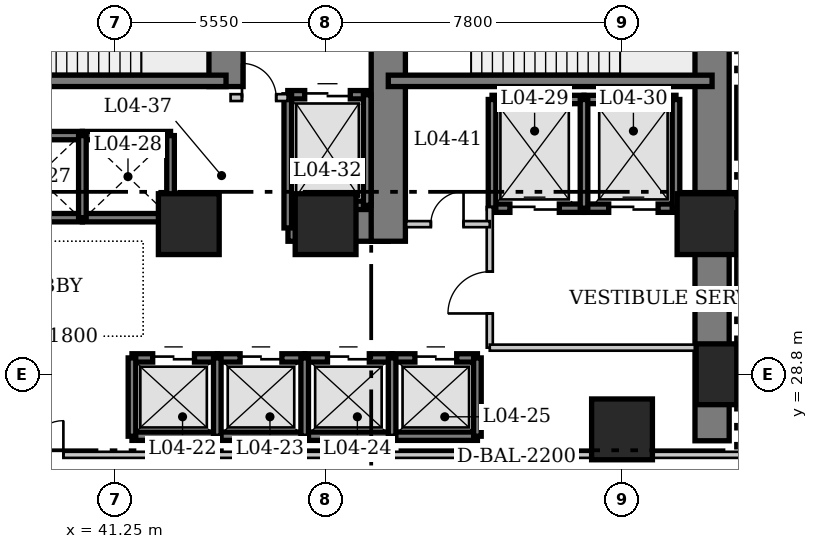
"""IFC4 building model, lengths in metres.
Left out: names, types, materials, properties, quantities, classifications, styles, units other than length and angle.
Written with IfcOpenShell. Run it as: python <this file> out.ifc"""

import sys

from ifc_helpers import new_model, si_unit, direction, frame, frame_2d, origin, origin_2d, place, context, subcontext, project, spatial, rectangle, extrude, element, fill, save


model = new_model("IFC4")
c1 = context("Model", 3, precision=1e-05, world=origin(), true_north=direction((0.0, 1.0)))
c2 = subcontext(c1, "Body", "Model", "MODEL_VIEW")
j1 = project(units=[si_unit("LENGTHUNIT", "METRE"), si_unit("PLANEANGLEUNIT", "RADIAN")], contexts=[c1])
p1 = place(None, origin())
s1 = spatial("IfcSite", under=j1, at=p1, CompositionType="ELEMENT")
p2 = place(p1, origin())
s2 = spatial("IfcBuilding", under=s1, at=p2, CompositionType="ELEMENT")
p3 = place(p2, frame((0.0, 0.0, 20.8)))
s3 = spatial("IfcBuildingStorey", under=s2, at=p3, CompositionType="ELEMENT", Elevation=20.8)
p4 = place(p3, frame((56.97, 27.05, 0.0), z_axis=(0.0, 0.0, 1.0), x_axis=(0.0, 1.0, 0.0)))
e1 = element("IfcWall", 1, at=p4, inside=s3, PredefinedType="SHEAR", context=c2, shape_type="SweptSolid", body=[
    extrude(rectangle(XDim=13.72, YDim=0.9, at=frame_2d((6.86, 0.0))), origin(), (0.0, 0.0, 1.0), 5.2),
])
p5 = place(p3, frame((45.81, 32.75, 0.0), z_axis=(0.0, 0.0, 1.0), x_axis=(1.0, 0.0, 0.0)))
e2 = element("IfcWall", 2, at=p5, inside=s3, PredefinedType="SHEAR", context=c2, shape_type="SweptSolid", body=[
    extrude(rectangle(XDim=2.64, YDim=0.9, at=frame_2d((1.32, 0.0))), origin(), (0.0, 0.0, 1.0), 5.2),
])
p6 = place(p3, frame((44.18, 36.37, 0.0), z_axis=(0.0, 0.0, 1.0), x_axis=(0.0, 1.0, 0.0)))
e3 = element("IfcWall", 3, at=p6, inside=s3, PredefinedType="SHEAR", context=c2, shape_type="SweptSolid", body=[
    extrude(rectangle(XDim=3.95, YDim=0.9, at=frame_2d((1.975, 0.0))), origin(), (0.0, 0.0, 1.0), 5.2),
])
p7 = place(p3, frame((48.45, 32.3, 0.0), z_axis=(0.0, 0.0, 1.0), x_axis=(0.0, 1.0, 0.0)))
e4 = element("IfcWall", 4, at=p7, inside=s3, PredefinedType="SHEAR", context=c2, shape_type="SweptSolid", body=[
    extrude(rectangle(XDim=8.02, YDim=0.9, at=frame_2d((4.01, 0.0))), origin(), (0.0, 0.0, 1.0), 5.2),
])
p8 = place(p7, frame((5.9, 0.0, 0.0)))
e5 = element("IfcOpeningElement", 5, at=p8, cuts=e4, PredefinedType="OPENING", context=c2, shape_type="SweptSolid", body=[
    extrude(rectangle(XDim=1.1, YDim=2.15, at=frame_2d((0.55, 1.075))), frame((0.0, 0.46, 0.0), z_axis=(0.0, -1.0, 0.0), x_axis=(1.0, 0.0, 0.0)), (0.0, 0.0, 1.0), 0.92),
])
p9 = place(p3, frame((35.85, 36.52, 0.0), z_axis=(0.0, 0.0, 1.0), x_axis=(1.0, 0.0, 0.0)))
e6 = element("IfcWall", 6, at=p9, inside=s3, PredefinedType="SHEAR", context=c2, shape_type="SweptSolid", body=[
    extrude(rectangle(XDim=8.33, YDim=0.3, at=frame_2d((4.165, 0.0))), origin(), (0.0, 0.0, 1.0), 5.2),
])
p10 = place(p3, frame((48.45, 36.52, 0.0), z_axis=(0.0, 0.0, 1.0), x_axis=(1.0, 0.0, 0.0)))
e7 = element("IfcWall", 7, at=p10, inside=s3, PredefinedType="SHEAR", context=c2, shape_type="SweptSolid", body=[
    extrude(rectangle(XDim=8.52, YDim=0.3, at=frame_2d((4.26, 0.0))), origin(), (0.0, 0.0, 1.0), 5.2),
])
for number, where, z_axis, x_axis in (
    (8, (57.35, 28.8, 0.0), (0.0, 0.0, 1.0), (1.0, 0.0, 0.0)),
    (9, (43.2, 32.75, 0.0), (0.0, 0.0, 1.0), (1.0, 0.0, 0.0)),
    (10, (46.8, 32.75, 0.0), (0.0, 0.0, 1.0), (1.0, 0.0, 0.0)),
    (11, (54.6, 27.35, 0.0), (0.0, 0.0, 1.0), (1.0, 0.0, 0.0)),
    (12, (56.85, 32.75, 0.0), (0.0, 0.0, 1.0), (1.0, 0.0, 0.0)),
):
    element("IfcColumn", number, at=place(p3, frame(where, z_axis=z_axis, x_axis=x_axis)), inside=s3, PredefinedType="COLUMN", context=c2, shape_type="SweptSolid", body=[
        extrude(rectangle(XDim=1.6, YDim=1.6, at=origin_2d()), origin(), (0.0, 0.0, 1.0), 5.2),
    ])
p11 = place(p3, frame((41.705, 29.23, 0.0), z_axis=(0.0, 0.0, 1.0), x_axis=(1.0, 0.0, 0.0)))
e13 = element("IfcWall", 13, at=p11, inside=s3, PredefinedType="SHEAR", context=c2, shape_type="SweptSolid", body=[
    extrude(rectangle(XDim=2.245, YDim=0.22, at=frame_2d((1.123, 0.0))), origin(), (0.0, 0.0, 1.0), 5.2),
])
p12 = place(p11, frame((0.545, 0.0, 0.0)))
e14 = element("IfcOpeningElement", 14, at=p12, cuts=e13, PredefinedType="OPENING", context=c2, shape_type="SweptSolid", body=[
    extrude(rectangle(XDim=1.1, YDim=2.15, at=frame_2d((0.55, 1.075))), frame((0.0, 0.12, 0.0), z_axis=(0.0, -1.0, 0.0), x_axis=(1.0, 0.0, 0.0)), (0.0, 0.0, 1.0), 0.24),
])
p13 = place(p3, frame((41.705, 27.17, 0.0), z_axis=(0.0, 0.0, 1.0), x_axis=(1.0, 0.0, 0.0)))
e15 = element("IfcWall", 15, at=p13, inside=s3, PredefinedType="SHEAR", context=c2, shape_type="SweptSolid", body=[
    extrude(rectangle(XDim=2.245, YDim=0.22, at=frame_2d((1.123, 0.0))), origin(), (0.0, 0.0, 1.0), 5.2),
])
p14 = place(p3, frame((41.705, 27.17, 0.0), z_axis=(0.0, 0.0, 1.0), x_axis=(0.0, 1.0, 0.0)))
e16 = element("IfcWall", 16, at=p14, inside=s3, PredefinedType="SHEAR", context=c2, shape_type="SweptSolid", body=[
    extrude(rectangle(XDim=2.06, YDim=0.2, at=frame_2d((1.03, 0.0))), origin(), (0.0, 0.0, 1.0), 5.2),
])
p15 = place(p3, frame((43.95, 29.23, 0.0), z_axis=(0.0, 0.0, 1.0), x_axis=(1.0, 0.0, 0.0)))
e17 = element("IfcWall", 17, at=p15, inside=s3, PredefinedType="SHEAR", context=c2, shape_type="SweptSolid", body=[
    extrude(rectangle(XDim=2.3, YDim=0.22, at=frame_2d((1.15, 0.0))), origin(), (0.0, 0.0, 1.0), 5.2),
])
p16 = place(p15, frame((0.6, 0.0, 0.0)))
e18 = element("IfcOpeningElement", 18, at=p16, cuts=e17, PredefinedType="OPENING", context=c2, shape_type="SweptSolid", body=[
    extrude(rectangle(XDim=1.1, YDim=2.15, at=frame_2d((0.55, 1.075))), frame((0.0, 0.12, 0.0), z_axis=(0.0, -1.0, 0.0), x_axis=(1.0, 0.0, 0.0)), (0.0, 0.0, 1.0), 0.24),
])
p17 = place(p3, frame((43.95, 27.17, 0.0), z_axis=(0.0, 0.0, 1.0), x_axis=(1.0, 0.0, 0.0)))
e19 = element("IfcWall", 19, at=p17, inside=s3, PredefinedType="SHEAR", context=c2, shape_type="SweptSolid", body=[
    extrude(rectangle(XDim=2.3, YDim=0.22, at=frame_2d((1.15, 0.0))), origin(), (0.0, 0.0, 1.0), 5.2),
])
p18 = place(p3, frame((43.95, 27.17, 0.0), z_axis=(0.0, 0.0, 1.0), x_axis=(0.0, 1.0, 0.0)))
e20 = element("IfcWall", 20, at=p18, inside=s3, PredefinedType="SHEAR", context=c2, shape_type="SweptSolid", body=[
    extrude(rectangle(XDim=2.06, YDim=0.2, at=frame_2d((1.03, 0.0))), origin(), (0.0, 0.0, 1.0), 5.2),
])
p19 = place(p3, frame((46.25, 29.23, 0.0), z_axis=(0.0, 0.0, 1.0), x_axis=(1.0, 0.0, 0.0)))
e21 = element("IfcWall", 21, at=p19, inside=s3, PredefinedType="SHEAR", context=c2, shape_type="SweptSolid", body=[
    extrude(rectangle(XDim=2.3, YDim=0.22, at=frame_2d((1.15, 0.0))), origin(), (0.0, 0.0, 1.0), 5.2),
])
p20 = place(p19, frame((0.6, 0.0, 0.0)))
e22 = element("IfcOpeningElement", 22, at=p20, cuts=e21, PredefinedType="OPENING", context=c2, shape_type="SweptSolid", body=[
    extrude(rectangle(XDim=1.1, YDim=2.15, at=frame_2d((0.55, 1.075))), frame((0.0, 0.12, 0.0), z_axis=(0.0, -1.0, 0.0), x_axis=(1.0, 0.0, 0.0)), (0.0, 0.0, 1.0), 0.24),
])
p21 = place(p3, frame((46.25, 27.17, 0.0), z_axis=(0.0, 0.0, 1.0), x_axis=(1.0, 0.0, 0.0)))
e23 = element("IfcWall", 23, at=p21, inside=s3, PredefinedType="SHEAR", context=c2, shape_type="SweptSolid", body=[
    extrude(rectangle(XDim=2.3, YDim=0.22, at=frame_2d((1.15, 0.0))), origin(), (0.0, 0.0, 1.0), 5.2),
])
p22 = place(p3, frame((46.25, 27.17, 0.0), z_axis=(0.0, 0.0, 1.0), x_axis=(0.0, 1.0, 0.0)))
e24 = element("IfcWall", 24, at=p22, inside=s3, PredefinedType="SHEAR", context=c2, shape_type="SweptSolid", body=[
    extrude(rectangle(XDim=2.06, YDim=0.2, at=frame_2d((1.03, 0.0))), origin(), (0.0, 0.0, 1.0), 5.2),
])
p23 = place(p3, frame((48.55, 29.23, 0.0), z_axis=(0.0, 0.0, 1.0), x_axis=(1.0, 0.0, 0.0)))
e25 = element("IfcWall", 25, at=p23, inside=s3, PredefinedType="SHEAR", context=c2, shape_type="SweptSolid", body=[
    extrude(rectangle(XDim=2.245, YDim=0.22, at=frame_2d((1.123, 0.0))), origin(), (0.0, 0.0, 1.0), 5.2),
])
p24 = place(p23, frame((0.6, 0.0, 0.0)))
e26 = element("IfcOpeningElement", 26, at=p24, cuts=e25, PredefinedType="OPENING", context=c2, shape_type="SweptSolid", body=[
    extrude(rectangle(XDim=1.1, YDim=2.15, at=frame_2d((0.55, 1.075))), frame((0.0, 0.12, 0.0), z_axis=(0.0, -1.0, 0.0), x_axis=(1.0, 0.0, 0.0)), (0.0, 0.0, 1.0), 0.24),
])
p25 = place(p3, frame((48.55, 27.17, 0.0), z_axis=(0.0, 0.0, 1.0), x_axis=(1.0, 0.0, 0.0)))
e27 = element("IfcWall", 27, at=p25, inside=s3, PredefinedType="SHEAR", context=c2, shape_type="SweptSolid", body=[
    extrude(rectangle(XDim=2.245, YDim=0.22, at=frame_2d((1.123, 0.0))), origin(), (0.0, 0.0, 1.0), 5.2),
])
for number, where, z_axis, x_axis in (
    (28, (48.55, 27.17, 0.0), (0.0, 0.0, 1.0), (0.0, 1.0, 0.0)),
    (29, (50.795, 27.17, 0.0), (0.0, 0.0, 1.0), (0.0, 1.0, 0.0)),
):
    element("IfcWall", number, at=place(p3, frame(where, z_axis=z_axis, x_axis=x_axis)), inside=s3, PredefinedType="SHEAR", context=c2, shape_type="SweptSolid", body=[
        extrude(rectangle(XDim=2.06, YDim=0.2, at=frame_2d((1.03, 0.0))), origin(), (0.0, 0.0, 1.0), 5.2),
    ])
for number, where, z_axis, x_axis in (
    (30, (38.0, 35.08, 0.0), (0.0, 0.0, 1.0), (1.0, 0.0, 0.0)),
    (31, (38.0, 32.92, 0.0), (0.0, 0.0, 1.0), (1.0, 0.0, 0.0)),
):
    element("IfcWall", number, at=place(p3, frame(where, z_axis=z_axis, x_axis=x_axis)), inside=s3, PredefinedType="SHEAR", context=c2, shape_type="SweptSolid", body=[
        extrude(rectangle(XDim=2.4, YDim=0.22, at=frame_2d((1.2, 0.0))), origin(), (0.0, 0.0, 1.0), 5.2),
    ])
for number, where, z_axis, x_axis in (
    (32, (40.4, 35.08, 0.0), (0.0, 0.0, 1.0), (1.0, 0.0, 0.0)),
    (33, (40.4, 32.92, 0.0), (0.0, 0.0, 1.0), (1.0, 0.0, 0.0)),
):
    element("IfcWall", number, at=place(p3, frame(where, z_axis=z_axis, x_axis=x_axis)), inside=s3, PredefinedType="SHEAR", context=c2, shape_type="SweptSolid", body=[
        extrude(rectangle(XDim=2.32, YDim=0.22, at=frame_2d((1.16, 0.0))), origin(), (0.0, 0.0, 1.0), 5.2),
    ])
for number, where, z_axis, x_axis in (
    (34, (40.4, 32.92, 0.0), (0.0, 0.0, 1.0), (0.0, 1.0, 0.0)),
    (35, (42.72, 32.92, 0.0), (0.0, 0.0, 1.0), (0.0, 1.0, 0.0)),
):
    element("IfcWall", number, at=place(p3, frame(where, z_axis=z_axis, x_axis=x_axis)), inside=s3, PredefinedType="SHEAR", context=c2, shape_type="SweptSolid", body=[
        extrude(rectangle(XDim=2.16, YDim=0.2, at=frame_2d((1.08, 0.0))), origin(), (0.0, 0.0, 1.0), 5.2),
    ])
p26 = place(p3, frame((51.18, 36.03, 0.0), z_axis=(0.0, 0.0, 1.0), x_axis=(1.0, 0.0, 0.0)))
e36 = element("IfcWall", 36, at=p26, inside=s3, PredefinedType="SHEAR", context=c2, shape_type="SweptSolid", body=[
    extrude(rectangle(XDim=2.42, YDim=0.22, at=frame_2d((1.21, 0.0))), origin(), (0.0, 0.0, 1.0), 5.2),
])
p27 = place(p3, frame((51.18, 33.17, 0.0), z_axis=(0.0, 0.0, 1.0), x_axis=(1.0, 0.0, 0.0)))
e37 = element("IfcWall", 37, at=p27, inside=s3, PredefinedType="SHEAR", context=c2, shape_type="SweptSolid", body=[
    extrude(rectangle(XDim=2.42, YDim=0.22, at=frame_2d((1.21, 0.0))), origin(), (0.0, 0.0, 1.0), 5.2),
])
p28 = place(p27, frame((0.47, 0.0, 0.0)))
e38 = element("IfcOpeningElement", 38, at=p28, cuts=e37, PredefinedType="OPENING", context=c2, shape_type="SweptSolid", body=[
    extrude(rectangle(XDim=1.3, YDim=2.15, at=frame_2d((0.65, 1.075))), frame((0.0, 0.12, 0.0), z_axis=(0.0, -1.0, 0.0), x_axis=(1.0, 0.0, 0.0)), (0.0, 0.0, 1.0), 0.24),
])
p29 = place(p3, frame((51.18, 33.17, 0.0), z_axis=(0.0, 0.0, 1.0), x_axis=(0.0, 1.0, 0.0)))
e39 = element("IfcWall", 39, at=p29, inside=s3, PredefinedType="SHEAR", context=c2, shape_type="SweptSolid", body=[
    extrude(rectangle(XDim=2.86, YDim=0.2, at=frame_2d((1.43, 0.0))), origin(), (0.0, 0.0, 1.0), 5.2),
])
p30 = place(p3, frame((53.6, 36.03, 0.0), z_axis=(0.0, 0.0, 1.0), x_axis=(1.0, 0.0, 0.0)))
e40 = element("IfcWall", 40, at=p30, inside=s3, PredefinedType="SHEAR", context=c2, shape_type="SweptSolid", body=[
    extrude(rectangle(XDim=2.42, YDim=0.22, at=frame_2d((1.21, 0.0))), origin(), (0.0, 0.0, 1.0), 5.2),
])
p31 = place(p3, frame((53.6, 33.17, 0.0), z_axis=(0.0, 0.0, 1.0), x_axis=(1.0, 0.0, 0.0)))
e41 = element("IfcWall", 41, at=p31, inside=s3, PredefinedType="SHEAR", context=c2, shape_type="SweptSolid", body=[
    extrude(rectangle(XDim=2.42, YDim=0.22, at=frame_2d((1.21, 0.0))), origin(), (0.0, 0.0, 1.0), 5.2),
])
p32 = place(p31, frame((0.65, 0.0, 0.0)))
e42 = element("IfcOpeningElement", 42, at=p32, cuts=e41, PredefinedType="OPENING", context=c2, shape_type="SweptSolid", body=[
    extrude(rectangle(XDim=1.3, YDim=2.15, at=frame_2d((0.65, 1.075))), frame((0.0, 0.12, 0.0), z_axis=(0.0, -1.0, 0.0), x_axis=(1.0, 0.0, 0.0)), (0.0, 0.0, 1.0), 0.24),
])
for number, where, z_axis, x_axis in (
    (43, (53.6, 33.17, 0.0), (0.0, 0.0, 1.0), (0.0, 1.0, 0.0)),
    (44, (56.02, 33.17, 0.0), (0.0, 0.0, 1.0), (0.0, 1.0, 0.0)),
):
    element("IfcWall", number, at=place(p3, frame(where, z_axis=z_axis, x_axis=x_axis)), inside=s3, PredefinedType="SHEAR", context=c2, shape_type="SweptSolid", body=[
        extrude(rectangle(XDim=2.86, YDim=0.2, at=frame_2d((1.43, 0.0))), origin(), (0.0, 0.0, 1.0), 5.2),
    ])
p33 = place(p3, frame((45.805, 36.155, 0.0), z_axis=(0.0, 0.0, 1.0), x_axis=(1.0, 0.0, 0.0)))
e45 = element("IfcWall", 45, at=p33, inside=s3, PredefinedType="SHEAR", context=c2, shape_type="SweptSolid", body=[
    extrude(rectangle(XDim=2.09, YDim=0.22, at=frame_2d((1.045, 0.0))), origin(), (0.0, 0.0, 1.0), 5.2),
])
p34 = place(p33, frame((0.445, 0.0, 0.0)))
e46 = element("IfcOpeningElement", 46, at=p34, cuts=e45, PredefinedType="OPENING", context=c2, shape_type="SweptSolid", body=[
    extrude(rectangle(XDim=1.2, YDim=2.15, at=frame_2d((0.6, 1.075))), frame((0.0, 0.12, 0.0), z_axis=(0.0, -1.0, 0.0), x_axis=(1.0, 0.0, 0.0)), (0.0, 0.0, 1.0), 0.24),
])
p35 = place(p3, frame((45.805, 33.245, 0.0), z_axis=(0.0, 0.0, 1.0), x_axis=(1.0, 0.0, 0.0)))
e47 = element("IfcWall", 47, at=p35, inside=s3, PredefinedType="SHEAR", context=c2, shape_type="SweptSolid", body=[
    extrude(rectangle(XDim=2.09, YDim=0.22, at=frame_2d((1.045, 0.0))), origin(), (0.0, 0.0, 1.0), 5.2),
])
p36 = place(p3, frame((45.805, 32.65, 0.0), z_axis=(0.0, 0.0, 1.0), x_axis=(0.0, 1.0, 0.0)))
e48 = element("IfcWall", 48, at=p36, inside=s3, PredefinedType="SHEAR", context=c2, shape_type="SweptSolid", body=[
    extrude(rectangle(XDim=3.505, YDim=0.2, at=frame_2d((1.752, 0.0))), origin(), (0.0, 0.0, 1.0), 5.2),
])
p37 = place(p3, frame((47.895, 33.245, 0.0), z_axis=(0.0, 0.0, 1.0), x_axis=(0.0, 1.0, 0.0)))
e49 = element("IfcWall", 49, at=p37, inside=s3, PredefinedType="SHEAR", context=c2, shape_type="SweptSolid", body=[
    extrude(rectangle(XDim=2.91, YDim=0.2, at=frame_2d((1.455, 0.0))), origin(), (0.0, 0.0, 1.0), 5.2),
])
p38 = place(p3, frame((44.3, 36.08, 0.0), z_axis=(0.0, 0.0, 1.0), x_axis=(1.0, 0.0, 0.0)))
e50 = element("IfcWall", 50, at=p38, inside=s3, PredefinedType="PARTITIONING", context=c2, shape_type="SweptSolid", body=[
    extrude(rectangle(XDim=1.5, YDim=0.18, at=frame_2d((0.75, 0.0))), origin(), (0.0, 0.0, 1.0), 4.94),
])
p39 = place(p38, frame((0.3, 0.0, 0.0)))
e51 = element("IfcOpeningElement", 51, at=p39, cuts=e50, PredefinedType="OPENING", context=c2, shape_type="SweptSolid", body=[
    extrude(rectangle(XDim=0.9, YDim=2.15, at=frame_2d((0.45, 1.075))), frame((0.0, 0.1, 0.0), z_axis=(0.0, -1.0, 0.0), x_axis=(1.0, 0.0, 0.0)), (0.0, 0.0, 1.0), 0.2),
])
p40 = place(p3, frame((51.12, 29.5, 0.0), z_axis=(0.0, 0.0, 1.0), x_axis=(0.0, 1.0, 0.0)))
e52 = element("IfcWall", 52, at=p40, inside=s3, PredefinedType="PARTITIONING", context=c2, shape_type="SweptSolid", body=[
    extrude(rectangle(XDim=3.7, YDim=0.16, at=frame_2d((1.85, 0.0))), origin(), (0.0, 0.0, 1.0), 4.94),
])
p41 = place(p40, frame((0.9, 0.0, 0.0)))
e53 = element("IfcOpeningElement", 53, at=p41, cuts=e52, PredefinedType="OPENING", context=c2, shape_type="SweptSolid", body=[
    extrude(rectangle(XDim=1.1, YDim=2.15, at=frame_2d((0.55, 1.075))), frame((0.0, 0.09, 0.0), z_axis=(0.0, -1.0, 0.0), x_axis=(1.0, 0.0, 0.0)), (0.0, 0.0, 1.0), 0.18),
])
p42 = place(p3, frame((51.12, 29.5, 0.0), z_axis=(0.0, 0.0, 1.0), x_axis=(1.0, 0.0, 0.0)))
e54 = element("IfcWall", 54, at=p42, inside=s3, PredefinedType="PARTITIONING", context=c2, shape_type="SweptSolid", body=[
    extrude(rectangle(XDim=5.63, YDim=0.16, at=frame_2d((2.815, 0.0))), origin(), (0.0, 0.0, 1.0), 4.94),
])
p43 = place(p3, frame((48.92, 32.75, 0.0), z_axis=(0.0, 0.0, 1.0), x_axis=(1.0, 0.0, 0.0)))
e55 = element("IfcWall", 55, at=p43, inside=s3, PredefinedType="PARTITIONING", context=c2, shape_type="SweptSolid", body=[
    extrude(rectangle(XDim=2.2, YDim=0.16, at=frame_2d((1.1, 0.0))), origin(), (0.0, 0.0, 1.0), 4.94),
])
p44 = place(p43, frame((0.65, 0.0, 0.0)))
e56 = element("IfcOpeningElement", 56, at=p44, cuts=e55, PredefinedType="OPENING", context=c2, shape_type="SweptSolid", body=[
    extrude(rectangle(XDim=0.86, YDim=2.05, at=frame_2d((0.43, 1.025))), frame((0.0, 0.09, 0.0), z_axis=(0.0, -1.0, 0.0), x_axis=(1.0, 0.0, 0.0)), (0.0, 0.0, 1.0), 0.18),
])
p45 = place(p3, frame((3.22, 26.68, 0.0), z_axis=(0.0, 0.0, 1.0), x_axis=(1.0, 0.0, 0.0)))
e57 = element("IfcWall", 57, at=p45, inside=s3, PredefinedType="PARTITIONING", context=c2, shape_type="SweptSolid", body=[
    extrude(rectangle(XDim=71.56, YDim=0.16, at=frame_2d((35.78, 0.0))), origin(), (0.0, 0.0, 1.0), 4.94),
])
p46 = place(p45, frame((34.88, 0.0, 0.0)))
e58 = element("IfcOpeningElement", 58, at=p46, cuts=e57, PredefinedType="OPENING", context=c2, shape_type="SweptSolid", body=[
    extrude(rectangle(XDim=1.8, YDim=2.2, at=frame_2d((0.9, 1.1))), frame((0.0, 0.09, 0.0), z_axis=(0.0, -1.0, 0.0), x_axis=(1.0, 0.0, 0.0)), (0.0, 0.0, 1.0), 0.18),
])
p47 = place(p45, frame((8.63, 0.0, 0.0)))
e59 = element("IfcOpeningElement", 59, at=p47, cuts=e57, PredefinedType="OPENING", context=c2, shape_type="SweptSolid", body=[
    extrude(rectangle(XDim=1.8, YDim=2.2, at=frame_2d((0.9, 1.1))), frame((0.0, 0.09, 0.0), z_axis=(0.0, -1.0, 0.0), x_axis=(1.0, 0.0, 0.0)), (0.0, 0.0, 1.0), 0.18),
])
p48 = place(p45, frame((61.53, 0.0, 0.0)))
e60 = element("IfcOpeningElement", 60, at=p48, cuts=e57, PredefinedType="OPENING", context=c2, shape_type="SweptSolid", body=[
    extrude(rectangle(XDim=1.8, YDim=2.2, at=frame_2d((0.9, 1.1))), frame((0.0, 0.09, 0.0), z_axis=(0.0, -1.0, 0.0), x_axis=(1.0, 0.0, 0.0)), (0.0, 0.0, 1.0), 0.18),
])
p49 = place(p12, origin())
e61 = element("IfcDoor", 61, at=p49, inside=s3, OperationType="DOUBLE_DOOR_SLIDING", PredefinedType="DOOR", context=c2, shape_type="SweptSolid", body=[
    extrude(rectangle(XDim=1.1, YDim=2.15, at=frame_2d((0.55, 1.075))), frame((0.0, 0.025, 0.0), z_axis=(0.0, -1.0, 0.0), x_axis=(1.0, 0.0, 0.0)), (0.0, 0.0, 1.0), 0.05),
])
fill(e14, e61)
p50 = place(p16, origin())
e62 = element("IfcDoor", 62, at=p50, inside=s3, OperationType="DOUBLE_DOOR_SLIDING", PredefinedType="DOOR", context=c2, shape_type="SweptSolid", body=[
    extrude(rectangle(XDim=1.1, YDim=2.15, at=frame_2d((0.55, 1.075))), frame((0.0, 0.025, 0.0), z_axis=(0.0, -1.0, 0.0), x_axis=(1.0, 0.0, 0.0)), (0.0, 0.0, 1.0), 0.05),
])
fill(e18, e62)
p51 = place(p20, origin())
e63 = element("IfcDoor", 63, at=p51, inside=s3, OperationType="DOUBLE_DOOR_SLIDING", PredefinedType="DOOR", context=c2, shape_type="SweptSolid", body=[
    extrude(rectangle(XDim=1.1, YDim=2.15, at=frame_2d((0.55, 1.075))), frame((0.0, 0.025, 0.0), z_axis=(0.0, -1.0, 0.0), x_axis=(1.0, 0.0, 0.0)), (0.0, 0.0, 1.0), 0.05),
])
fill(e22, e63)
p52 = place(p24, origin())
e64 = element("IfcDoor", 64, at=p52, inside=s3, OperationType="DOUBLE_DOOR_SLIDING", PredefinedType="DOOR", context=c2, shape_type="SweptSolid", body=[
    extrude(rectangle(XDim=1.1, YDim=2.15, at=frame_2d((0.55, 1.075))), frame((0.0, 0.025, 0.0), z_axis=(0.0, -1.0, 0.0), x_axis=(1.0, 0.0, 0.0)), (0.0, 0.0, 1.0), 0.05),
])
fill(e26, e64)
p53 = place(p28, origin())
e65 = element("IfcDoor", 65, at=p53, inside=s3, OperationType="DOUBLE_DOOR_SLIDING", PredefinedType="DOOR", context=c2, shape_type="SweptSolid", body=[
    extrude(rectangle(XDim=1.3, YDim=2.15, at=frame_2d((0.65, 1.075))), frame((0.0, 0.025, 0.0), z_axis=(0.0, -1.0, 0.0), x_axis=(1.0, 0.0, 0.0)), (0.0, 0.0, 1.0), 0.05),
])
fill(e38, e65)
p54 = place(p32, origin())
e66 = element("IfcDoor", 66, at=p54, inside=s3, OperationType="DOUBLE_DOOR_SLIDING", PredefinedType="DOOR", context=c2, shape_type="SweptSolid", body=[
    extrude(rectangle(XDim=1.3, YDim=2.15, at=frame_2d((0.65, 1.075))), frame((0.0, 0.025, 0.0), z_axis=(0.0, -1.0, 0.0), x_axis=(1.0, 0.0, 0.0)), (0.0, 0.0, 1.0), 0.05),
])
fill(e42, e66)
p55 = place(p34, origin())
e67 = element("IfcDoor", 67, at=p55, inside=s3, OperationType="DOUBLE_DOOR_SLIDING", PredefinedType="DOOR", context=c2, shape_type="SweptSolid", body=[
    extrude(rectangle(XDim=1.2, YDim=2.15, at=frame_2d((0.6, 1.075))), frame((0.0, 0.025, 0.0), z_axis=(0.0, -1.0, 0.0), x_axis=(1.0, 0.0, 0.0)), (0.0, 0.0, 1.0), 0.05),
])
fill(e46, e67)
p56 = place(p39, origin())
e68 = element("IfcDoor", 68, at=p56, inside=s3, OperationType="SINGLE_SWING_LEFT", PredefinedType="DOOR", context=c2, shape_type="SweptSolid", body=[
    extrude(rectangle(XDim=0.9, YDim=2.15, at=frame_2d((0.45, 1.075))), frame((0.0, 0.025, 0.0), z_axis=(0.0, -1.0, 0.0), x_axis=(1.0, 0.0, 0.0)), (0.0, 0.0, 1.0), 0.05),
])
fill(e51, e68)
p57 = place(p41, origin())
e69 = element("IfcDoor", 69, at=p57, inside=s3, OperationType="SINGLE_SWING_LEFT", PredefinedType="DOOR", context=c2, shape_type="SweptSolid", body=[
    extrude(rectangle(XDim=1.1, YDim=2.15, at=frame_2d((0.55, 1.075))), frame((0.0, 0.025, 0.0), z_axis=(0.0, -1.0, 0.0), x_axis=(1.0, 0.0, 0.0)), (0.0, 0.0, 1.0), 0.05),
])
fill(e53, e69)
p58 = place(p44, origin())
e70 = element("IfcDoor", 70, at=p58, inside=s3, OperationType="SINGLE_SWING_RIGHT", PredefinedType="DOOR", context=c2, shape_type="SweptSolid", body=[
    extrude(rectangle(XDim=0.86, YDim=2.05, at=frame_2d((0.43, 1.025))), frame((0.0, 0.025, 0.0), z_axis=(0.0, -1.0, 0.0), x_axis=(1.0, 0.0, 0.0)), (0.0, 0.0, 1.0), 0.05),
])
fill(e56, e70)
p59 = place(p46, origin())
e71 = element("IfcDoor", 71, at=p59, inside=s3, OperationType="DOUBLE_DOOR_SINGLE_SWING", PredefinedType="DOOR", context=c2, shape_type="SweptSolid", body=[
    extrude(rectangle(XDim=1.8, YDim=2.2, at=frame_2d((0.9, 1.1))), frame((0.0, 0.025, 0.0), z_axis=(0.0, -1.0, 0.0), x_axis=(1.0, 0.0, 0.0)), (0.0, 0.0, 1.0), 0.05),
])
fill(e58, e71)
save(model, sys.argv[1])
